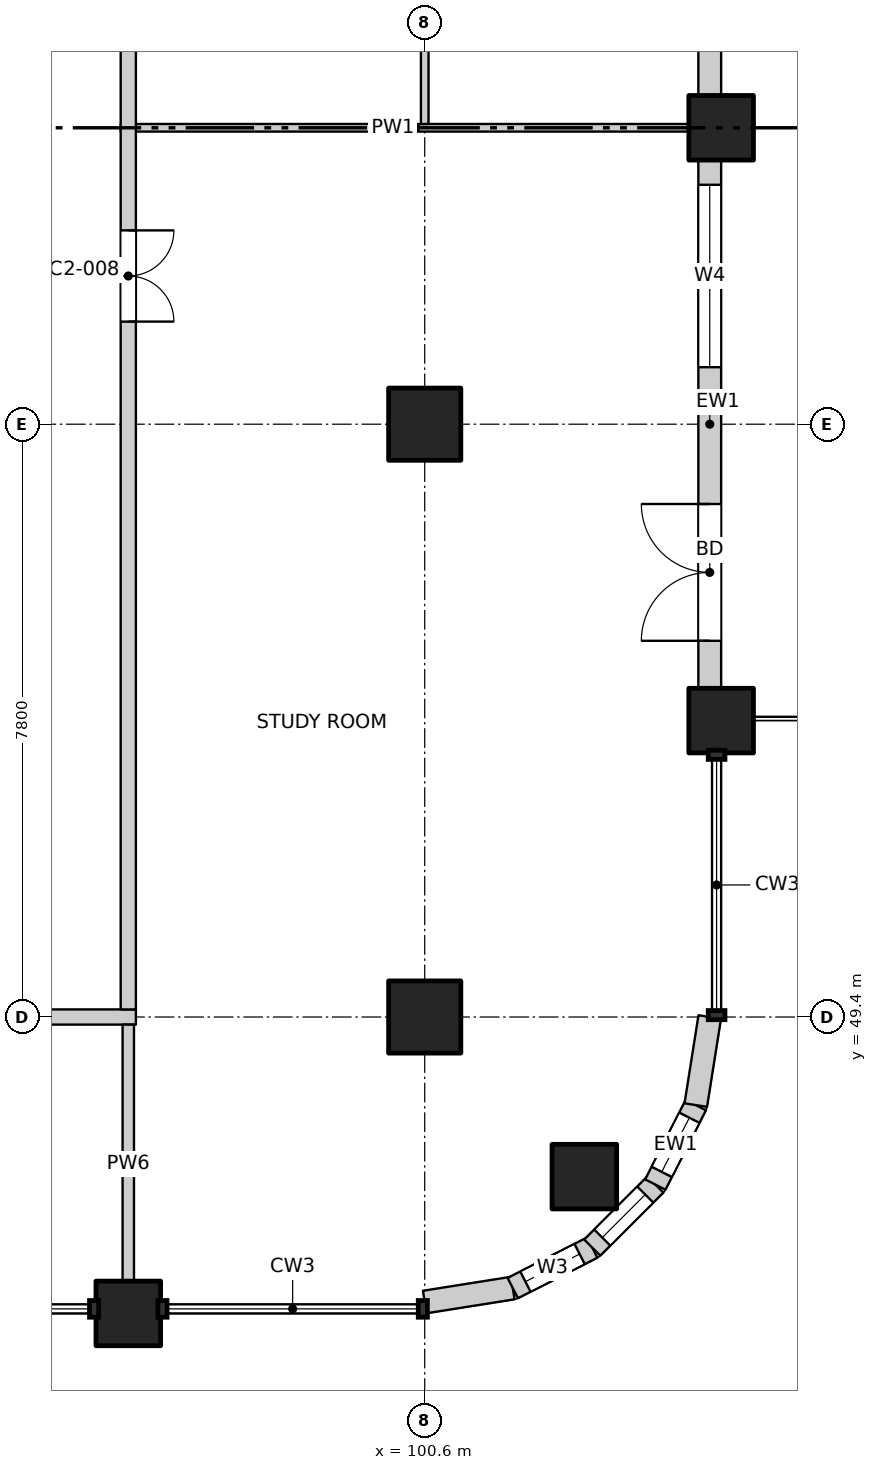
"""IFC4 building model, lengths in metres.
Left out: names, types, materials, properties, quantities, classifications, styles, units other than length and angle.
Written with IfcOpenShell. Run it as: python <this file> out.ifc"""

import sys

from ifc_helpers import new_model, si_unit, direction, frame, frame_2d, origin, origin_2d, place, context, subcontext, project, spatial, rectangle, extrude, element, fill, save


model = new_model("IFC4")
c1 = context("Model", 3, precision=1e-05, world=origin(), true_north=direction((0.0, 1.0)))
c2 = subcontext(c1, "Body", "Model", "MODEL_VIEW")
j1 = project(units=[si_unit("LENGTHUNIT", "METRE"), si_unit("PLANEANGLEUNIT", "RADIAN")], contexts=[c1])
p1 = place(None, origin())
s1 = spatial("IfcSite", under=j1, at=p1, CompositionType="ELEMENT")
p2 = place(p1, origin())
s2 = spatial("IfcBuilding", under=s1, at=p2, CompositionType="ELEMENT")
p3 = place(p2, frame((0.0, 0.0, 133.9)))
s3 = spatial("IfcBuildingStorey", under=s2, at=p3, CompositionType="ELEMENT", Elevation=133.9)
for number, where, z_axis, x_axis in (
    (1, (102.7, 47.3, -0.25), (0.0, 0.0, 1.0), (1.0, 0.0, 0.0)),
    (2, (104.5, 53.3, -0.25), (0.0, 0.0, 1.0), (1.0, 0.0, 0.0)),
    (3, (104.5, 61.1, -0.25), (0.0, 0.0, 1.0), (1.0, 0.0, 0.0)),
    (4, (96.7, 45.5, -0.25), (0.0, 0.0, 1.0), (1.0, 0.0, 0.0)),
):
    element("IfcColumn", number, at=place(p3, frame(where, z_axis=z_axis, x_axis=x_axis)), inside=s3, PredefinedType="COLUMN", context=c2, shape_type="SweptSolid", body=[
        extrude(rectangle(XDim=0.85, YDim=0.85, at=origin_2d()), origin(), (0.0, 0.0, 1.0), 3.4),
    ])
for number, where, z_axis, x_axis in (
    (5, (100.6, 49.4, -0.25), (0.0, 0.0, 1.0), (1.0, 0.0, 0.0)),
    (6, (100.6, 57.2, -0.25), (0.0, 0.0, 1.0), (1.0, 0.0, 0.0)),
):
    element("IfcColumn", number, at=place(p3, frame(where, z_axis=z_axis, x_axis=x_axis)), inside=s3, PredefinedType="COLUMN", context=c2, shape_type="SweptSolid", body=[
        extrude(rectangle(XDim=0.95, YDim=0.95, at=origin_2d()), origin(), (0.0, 0.0, 1.0), 3.4),
    ])
p4 = place(p3, frame((104.35, 53.725, 0.0), z_axis=(0.0, 0.0, 1.0), x_axis=(0.0, 1.0, 0.0)))
e7 = element("IfcWall", 7, at=p4, inside=s3, PredefinedType="SOLIDWALL", context=c2, shape_type="SweptSolid", body=[
    extrude(rectangle(XDim=6.95, YDim=0.3, at=frame_2d((3.475, 0.0))), origin(), (0.0, 0.0, 1.0), 2.7),
])
p5 = place(p4, frame((0.625, 0.0, 0.0)))
e8 = element("IfcOpeningElement", 8, at=p5, cuts=e7, PredefinedType="OPENING", context=c2, shape_type="SweptSolid", body=[
    extrude(rectangle(XDim=1.8, YDim=2.4, at=frame_2d((0.9, 1.2))), frame((0.0, 0.16, 0.0), z_axis=(0.0, -1.0, 0.0), x_axis=(1.0, 0.0, 0.0)), (0.0, 0.0, 1.0), 0.32),
])
p6 = place(p4, frame((4.225, 0.0, 0.6)))
e9 = element("IfcOpeningElement", 9, at=p6, cuts=e7, PredefinedType="OPENING", context=c2, shape_type="SweptSolid", body=[
    extrude(rectangle(XDim=2.4, YDim=2.1, at=frame_2d((1.2, 1.05))), frame((0.0, 0.16, 0.0), z_axis=(0.0, -1.0, 0.0), x_axis=(1.0, 0.0, 0.0)), (0.0, 0.0, 1.0), 0.32),
])
p7 = place(p3, frame((104.35, 61.525, 0.0), z_axis=(0.0, 0.0, 1.0), x_axis=(0.0, 1.0, 0.0)))
e10 = element("IfcWall", 10, at=p7, inside=s3, PredefinedType="SOLIDWALL", context=c2, shape_type="SweptSolid", body=[
    extrude(rectangle(XDim=6.95, YDim=0.3, at=frame_2d((3.475, 0.0))), origin(), (0.0, 0.0, 1.0), 2.7),
])
p8 = place(p7, frame((0.625, 0.0, 0.0)))
e11 = element("IfcOpeningElement", 11, at=p8, cuts=e10, PredefinedType="OPENING", context=c2, shape_type="SweptSolid", body=[
    extrude(rectangle(XDim=1.8, YDim=2.4, at=frame_2d((0.9, 1.2))), frame((0.0, 0.16, 0.0), z_axis=(0.0, -1.0, 0.0), x_axis=(1.0, 0.0, 0.0)), (0.0, 0.0, 1.0), 0.32),
])
p9 = place(p7, frame((4.225, 0.0, 0.6)))
e12 = element("IfcOpeningElement", 12, at=p9, cuts=e10, PredefinedType="OPENING", context=c2, shape_type="SweptSolid", body=[
    extrude(rectangle(XDim=2.4, YDim=2.1, at=frame_2d((1.2, 1.05))), frame((0.0, 0.16, 0.0), z_axis=(0.0, -1.0, 0.0), x_axis=(1.0, 0.0, 0.0)), (0.0, 0.0, 1.0), 0.32),
])
p10 = place(p3, frame((100.6, 45.65, 0.0), z_axis=(0.0, 0.0, 1.0), x_axis=(0.987678452879, 0.156496880861, 0.0)))
e13 = element("IfcWall", 13, at=p10, inside=s3, PredefinedType="SOLIDWALL", context=c2, shape_type="SweptSolid", body=[
    extrude(rectangle(XDim=1.173, YDim=0.3, at=frame_2d((0.586, 0.0))), origin(), (0.0, 0.0, 1.0), 2.7),
])
p11 = place(p3, frame((101.759, 45.833, 0.0), z_axis=(0.0, 0.0, 1.0), x_axis=(0.890988677504, 0.454025524128, 0.0)))
e14 = element("IfcWall", 14, at=p11, inside=s3, PredefinedType="SOLIDWALL", context=c2, shape_type="SweptSolid", body=[
    extrude(rectangle(XDim=1.173, YDim=0.3, at=frame_2d((0.587, 0.0))), origin(), (0.0, 0.0, 1.0), 2.7),
])
p12 = place(p11, frame((0.187, 0.0, 0.9)))
e15 = element("IfcOpeningElement", 15, at=p12, cuts=e14, PredefinedType="OPENING", context=c2, shape_type="SweptSolid", body=[
    extrude(rectangle(XDim=0.8, YDim=1.2, at=frame_2d((0.4, 0.6))), frame((0.0, 0.16, 0.0), z_axis=(0.0, -1.0, 0.0), x_axis=(1.0, 0.0, 0.0)), (0.0, 0.0, 1.0), 0.32),
])
p13 = place(p3, frame((102.804, 46.366, 0.0), z_axis=(0.0, 0.0, 1.0), x_axis=(0.707106781187, 0.707106781187, 0.0)))
e16 = element("IfcWall", 16, at=p13, inside=s3, PredefinedType="SOLIDWALL", context=c2, shape_type="SweptSolid", body=[
    extrude(rectangle(XDim=1.173, YDim=0.3, at=frame_2d((0.586, 0.0))), origin(), (0.0, 0.0, 1.0), 2.7),
])
p14 = place(p13, frame((0.187, 0.0, 0.9)))
e17 = element("IfcOpeningElement", 17, at=p14, cuts=e16, PredefinedType="OPENING", context=c2, shape_type="SweptSolid", body=[
    extrude(rectangle(XDim=0.8, YDim=1.2, at=frame_2d((0.4, 0.6))), frame((0.0, 0.16, 0.0), z_axis=(0.0, -1.0, 0.0), x_axis=(1.0, 0.0, 0.0)), (0.0, 0.0, 1.0), 0.32),
])
p15 = place(p3, frame((103.634, 47.196, 0.0), z_axis=(0.0, 0.0, 1.0), x_axis=(0.454025524128, 0.890988677504, 0.0)))
e18 = element("IfcWall", 18, at=p15, inside=s3, PredefinedType="SOLIDWALL", context=c2, shape_type="SweptSolid", body=[
    extrude(rectangle(XDim=1.173, YDim=0.3, at=frame_2d((0.587, 0.0))), origin(), (0.0, 0.0, 1.0), 2.7),
])
p16 = place(p15, frame((0.187, 0.0, 0.9)))
e19 = element("IfcOpeningElement", 19, at=p16, cuts=e18, PredefinedType="OPENING", context=c2, shape_type="SweptSolid", body=[
    extrude(rectangle(XDim=0.8, YDim=1.2, at=frame_2d((0.4, 0.6))), frame((0.0, 0.16, 0.0), z_axis=(0.0, -1.0, 0.0), x_axis=(1.0, 0.0, 0.0)), (0.0, 0.0, 1.0), 0.32),
])
p17 = place(p3, frame((104.167, 48.241, 0.0), z_axis=(0.0, 0.0, 1.0), x_axis=(0.156496880861, 0.987678452879, 0.0)))
e20 = element("IfcWall", 20, at=p17, inside=s3, PredefinedType="SOLIDWALL", context=c2, shape_type="SweptSolid", body=[
    extrude(rectangle(XDim=1.173, YDim=0.3, at=frame_2d((0.586, 0.0))), origin(), (0.0, 0.0, 1.0), 2.7),
])
p18 = place(p3, frame((73.2, 49.4, 0.0), z_axis=(0.0, 0.0, 1.0), x_axis=(1.0, 0.0, 0.0)))
e21 = element("IfcWall", 21, at=p18, inside=s3, PredefinedType="PARTITIONING", context=c2, shape_type="SweptSolid", body=[
    extrude(rectangle(XDim=23.6, YDim=0.2, at=frame_2d((11.8, 0.0))), origin(), (0.0, 0.0, 1.0), 3.15),
])
p19 = place(p18, frame((2.225, 0.0, 0.0)))
e22 = element("IfcOpeningElement", 22, at=p19, cuts=e21, PredefinedType="OPENING", context=c2, shape_type="SweptSolid", body=[
    extrude(rectangle(XDim=1.2, YDim=2.1, at=frame_2d((0.6, 1.05))), frame((0.0, 0.11, 0.0), z_axis=(0.0, -1.0, 0.0), x_axis=(1.0, 0.0, 0.0)), (0.0, 0.0, 1.0), 0.22),
])
p20 = place(p18, frame((15.1, 0.0, 0.0)))
e23 = element("IfcOpeningElement", 23, at=p20, cuts=e21, PredefinedType="OPENING", context=c2, shape_type="SweptSolid", body=[
    extrude(rectangle(XDim=1.2, YDim=2.1, at=frame_2d((0.6, 1.05))), frame((0.0, 0.11, 0.0), z_axis=(0.0, -1.0, 0.0), x_axis=(1.0, 0.0, 0.0)), (0.0, 0.0, 1.0), 0.22),
])
p21 = place(p3, frame((96.6, 61.1, 0.0), z_axis=(0.0, 0.0, 1.0), x_axis=(1.0, 0.0, 0.0)))
e24 = element("IfcWall", 24, at=p21, inside=s3, PredefinedType="PARTITIONING", context=c2, shape_type="SweptSolid", body=[
    extrude(rectangle(XDim=7.765, YDim=0.1, at=frame_2d((3.882, 0.0))), origin(), (0.0, 0.0, 1.0), 2.55),
])
p22 = place(p3, frame((96.7, 45.635, 0.0), z_axis=(0.0, 0.0, 1.0), x_axis=(0.0, 1.0, 0.0)))
e25 = element("IfcWall", 25, at=p22, inside=s3, PredefinedType="PARTITIONING", context=c2, shape_type="SweptSolid", body=[
    extrude(rectangle(XDim=3.665, YDim=0.15, at=frame_2d((1.833, 0.0))), origin(), (0.0, 0.0, 1.0), 3.15),
])
p23 = place(p3, frame((96.7, 49.5, 0.0), z_axis=(0.0, 0.0, 1.0), x_axis=(0.0, 1.0, 0.0)))
e26 = element("IfcWall", 26, at=p23, inside=s3, PredefinedType="PARTITIONING", context=c2, shape_type="SweptSolid", body=[
    extrude(rectangle(XDim=34.865, YDim=0.2, at=frame_2d((17.433, 0.0))), origin(), (0.0, 0.0, 1.0), 3.15),
])
p24 = place(p23, frame((9.05, 0.0, 0.0)))
e27 = element("IfcOpeningElement", 27, at=p24, cuts=e26, PredefinedType="OPENING", context=c2, shape_type="SweptSolid", body=[
    extrude(rectangle(XDim=1.2, YDim=2.1, at=frame_2d((0.6, 1.05))), frame((0.0, 0.11, 0.0), z_axis=(0.0, -1.0, 0.0), x_axis=(1.0, 0.0, 0.0)), (0.0, 0.0, 1.0), 0.22),
])
p25 = place(p23, frame((12.95, 0.0, 0.0)))
e28 = element("IfcOpeningElement", 28, at=p25, cuts=e26, PredefinedType="OPENING", context=c2, shape_type="SweptSolid", body=[
    extrude(rectangle(XDim=1.2, YDim=2.1, at=frame_2d((0.6, 1.05))), frame((0.0, 0.11, 0.0), z_axis=(0.0, -1.0, 0.0), x_axis=(1.0, 0.0, 0.0)), (0.0, 0.0, 1.0), 0.22),
])
p26 = place(p23, frame((28.55, 0.0, 0.0)))
e29 = element("IfcOpeningElement", 29, at=p26, cuts=e26, PredefinedType="OPENING", context=c2, shape_type="SweptSolid", body=[
    extrude(rectangle(XDim=1.2, YDim=2.1, at=frame_2d((0.6, 1.05))), frame((0.0, 0.11, 0.0), z_axis=(0.0, -1.0, 0.0), x_axis=(1.0, 0.0, 0.0)), (0.0, 0.0, 1.0), 0.22),
])
p27 = place(p3, frame((100.6, 61.15, 0.0), z_axis=(0.0, 0.0, 1.0), x_axis=(0.0, 1.0, 0.0)))
e30 = element("IfcWall", 30, at=p27, inside=s3, PredefinedType="PARTITIONING", context=c2, shape_type="SweptSolid", body=[
    extrude(rectangle(XDim=15.5, YDim=0.1, at=frame_2d((7.75, 0.0))), origin(), (0.0, 0.0, 1.0), 3.15),
])
p28 = place(p27, frame((7.15, 0.0, 0.0)))
e31 = element("IfcOpeningElement", 31, at=p28, cuts=e30, PredefinedType="OPENING", context=c2, shape_type="SweptSolid", body=[
    extrude(rectangle(XDim=1.2, YDim=2.1, at=frame_2d((0.6, 1.05))), frame((0.0, 0.06, 0.0), z_axis=(0.0, -1.0, 0.0), x_axis=(1.0, 0.0, 0.0)), (0.0, 0.0, 1.0), 0.12),
])
p29 = place(p5, origin())
e32 = element("IfcDoor", 32, at=p29, inside=s3, OperationType="DOUBLE_DOOR_SINGLE_SWING", PredefinedType="DOOR", context=c2, shape_type="SweptSolid", body=[
    extrude(rectangle(XDim=1.8, YDim=2.4, at=frame_2d((0.9, 1.2))), frame((0.0, 0.025, 0.0), z_axis=(0.0, -1.0, 0.0), x_axis=(1.0, 0.0, 0.0)), (0.0, 0.0, 1.0), 0.05),
])
fill(e8, e32)
p30 = place(p6, origin())
e33 = element("IfcWindow", 33, at=p30, inside=s3, PartitioningType="SINGLE_PANEL", PredefinedType="WINDOW", context=c2, shape_type="SweptSolid", body=[
    extrude(rectangle(XDim=2.4, YDim=2.1, at=frame_2d((1.2, 1.05))), frame((0.0, 0.03, 0.0), z_axis=(0.0, -1.0, 0.0), x_axis=(1.0, 0.0, 0.0)), (0.0, 0.0, 1.0), 0.06),
])
fill(e9, e33)
p31 = place(p12, origin())
e34 = element("IfcWindow", 34, at=p31, inside=s3, PartitioningType="SINGLE_PANEL", PredefinedType="WINDOW", context=c2, shape_type="SweptSolid", body=[
    extrude(rectangle(XDim=0.8, YDim=1.2, at=frame_2d((0.4, 0.6))), frame((0.0, 0.03, 0.0), z_axis=(0.0, -1.0, 0.0), x_axis=(1.0, 0.0, 0.0)), (0.0, 0.0, 1.0), 0.06),
])
fill(e15, e34)
p32 = place(p14, origin())
e35 = element("IfcWindow", 35, at=p32, inside=s3, PartitioningType="SINGLE_PANEL", PredefinedType="WINDOW", context=c2, shape_type="SweptSolid", body=[
    extrude(rectangle(XDim=0.8, YDim=1.2, at=frame_2d((0.4, 0.6))), frame((0.0, 0.03, 0.0), z_axis=(0.0, -1.0, 0.0), x_axis=(1.0, 0.0, 0.0)), (0.0, 0.0, 1.0), 0.06),
])
fill(e17, e35)
p33 = place(p16, origin())
e36 = element("IfcWindow", 36, at=p33, inside=s3, PartitioningType="SINGLE_PANEL", PredefinedType="WINDOW", context=c2, shape_type="SweptSolid", body=[
    extrude(rectangle(XDim=0.8, YDim=1.2, at=frame_2d((0.4, 0.6))), frame((0.0, 0.03, 0.0), z_axis=(0.0, -1.0, 0.0), x_axis=(1.0, 0.0, 0.0)), (0.0, 0.0, 1.0), 0.06),
])
fill(e19, e36)
p34 = place(p24, origin())
e37 = element("IfcDoor", 37, at=p34, inside=s3, OperationType="DOUBLE_DOOR_SINGLE_SWING", PredefinedType="DOOR", context=c2, shape_type="SweptSolid", body=[
    extrude(rectangle(XDim=1.2, YDim=2.1, at=frame_2d((0.6, 1.05))), frame((0.0, 0.025, 0.0), z_axis=(0.0, -1.0, 0.0), x_axis=(1.0, 0.0, 0.0)), (0.0, 0.0, 1.0), 0.05),
])
fill(e27, e37)
save(model, sys.argv[1])
